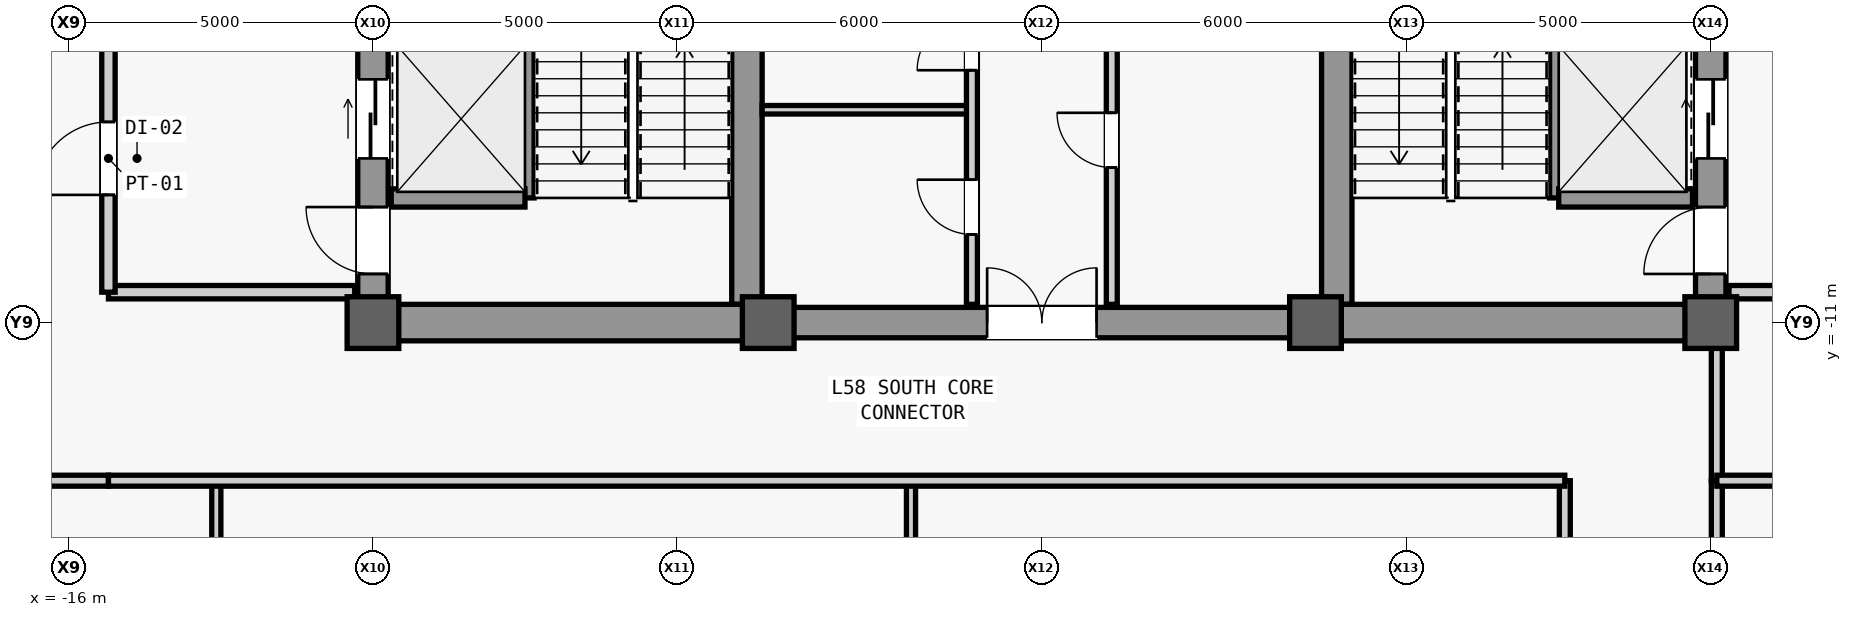
"""IFC4 building model, lengths in metres.
Left out: names, types, materials, properties, quantities, classifications, styles, units other than length and angle.
Written with IfcOpenShell. Run it as: python <this file> out.ifc"""

import sys

from ifc_helpers import new_model, si_unit, direction, frame, frame_2d, origin, origin_2d, place, context, subcontext, project, spatial, rectangle, extrude, source, transform, mapped, element, fill, save


model = new_model("IFC4")
c1 = context("Model", 3, precision=1e-05, world=origin(), true_north=direction((0.0, 1.0)))
c2 = subcontext(c1, "Body", "Model", "MODEL_VIEW")
j1 = project(units=[si_unit("LENGTHUNIT", "METRE"), si_unit("PLANEANGLEUNIT", "RADIAN")], contexts=[c1])
p1 = place(None, origin())
s1 = spatial("IfcSite", under=j1, at=p1, CompositionType="ELEMENT")
p2 = place(p1, origin())
s2 = spatial("IfcBuilding", under=s1, at=p2, CompositionType="ELEMENT")
p3 = place(p2, frame((0.0, 0.0, 247.1)))
s3 = spatial("IfcBuildingStorey", under=s2, at=p3, CompositionType="ELEMENT", Elevation=247.1)
m1 = source(origin(), c2, "Body", "SweptSolid", [
    extrude(rectangle(XDim=22.0, YDim=0.5, at=frame_2d((11.0, 0.0))), origin(), (0.0, 0.0, 1.0), 3.78),
])
p4 = place(p3, frame((-11.0, -11.0, 0.0), z_axis=(0.0, 0.0, 1.0), x_axis=(0.0, 1.0, 0.0)))
e1 = element("IfcWall", 1, at=p4, inside=s3, PredefinedType="SHEAR", context=c2, shape_type="MappedRepresentation", body=[
    mapped(m1, transform((0.0, 0.0, 0.0), scale=1.0)),
])
m2 = source(origin(), c2, "Body", "SweptSolid", [
    extrude(rectangle(XDim=1.1, YDim=2.2, at=frame_2d((0.55, 1.1))), frame((0.0, 0.26, 0.0), z_axis=(0.0, -1.0, 0.0), x_axis=(1.0, 0.0, 0.0)), (0.0, 0.0, 1.0), 0.52),
])
p5 = place(p4, frame((0.8, 0.0, 0.0)))
e2 = element("IfcOpeningElement", 2, at=p5, cuts=e1, PredefinedType="OPENING", context=c2, shape_type="MappedRepresentation", body=[
    mapped(m2, transform((0.0, 0.0, 0.0), scale=1.0)),
])
p6 = place(p4, frame((12.5, 0.0, 0.0)))
e3 = element("IfcOpeningElement", 3, at=p6, cuts=e1, PredefinedType="OPENING", context=c2, shape_type="MappedRepresentation", body=[
    mapped(m2, transform((0.0, 0.0, 0.0), scale=1.0)),
])
m3 = source(origin(), c2, "Body", "SweptSolid", [
    extrude(rectangle(XDim=0.9, YDim=2.15, at=frame_2d((0.45, 1.075))), frame((0.0, 0.26, 0.0), z_axis=(0.0, -1.0, 0.0), x_axis=(1.0, 0.0, 0.0)), (0.0, 0.0, 1.0), 0.52),
])
p7 = place(p4, frame((7.575, 0.0, 0.0)))
e4 = element("IfcOpeningElement", 4, at=p7, cuts=e1, PredefinedType="OPENING", context=c2, shape_type="MappedRepresentation", body=[
    mapped(m3, transform((0.0, 0.0, 0.0), scale=1.0)),
])
m4 = source(origin(), c2, "Body", "SweptSolid", [
    extrude(rectangle(XDim=1.3, YDim=2.3, at=frame_2d((0.65, 1.15))), frame((0.0, 0.26, 0.0), z_axis=(0.0, -1.0, 0.0), x_axis=(1.0, 0.0, 0.0)), (0.0, 0.0, 1.0), 0.52),
])
p8 = place(p4, frame((2.7, 0.0, 0.0)))
e5 = element("IfcOpeningElement", 5, at=p8, cuts=e1, PredefinedType="OPENING", context=c2, shape_type="MappedRepresentation", body=[
    mapped(m4, transform((0.0, 0.0, 0.0), scale=1.0)),
])
p9 = place(p3, frame((11.0, -11.0, 0.0), z_axis=(0.0, 0.0, 1.0), x_axis=(0.0, 1.0, 0.0)))
e6 = element("IfcWall", 6, at=p9, inside=s3, PredefinedType="SHEAR", context=c2, shape_type="MappedRepresentation", body=[
    mapped(m1, transform((0.0, 0.0, 0.0), scale=1.0)),
])
p10 = place(p9, frame((0.8, 0.0, 0.0)))
e7 = element("IfcOpeningElement", 7, at=p10, cuts=e6, PredefinedType="OPENING", context=c2, shape_type="MappedRepresentation", body=[
    mapped(m2, transform((0.0, 0.0, 0.0), scale=1.0)),
])
p11 = place(p9, frame((7.575, 0.0, 0.0)))
e8 = element("IfcOpeningElement", 8, at=p11, cuts=e6, PredefinedType="OPENING", context=c2, shape_type="MappedRepresentation", body=[
    mapped(m3, transform((0.0, 0.0, 0.0), scale=1.0)),
])
p12 = place(p9, frame((2.7, 0.0, 0.0)))
e9 = element("IfcOpeningElement", 9, at=p12, cuts=e6, PredefinedType="OPENING", context=c2, shape_type="MappedRepresentation", body=[
    mapped(m4, transform((0.0, 0.0, 0.0), scale=1.0)),
])
p13 = place(p9, frame((13.35, 0.0, 0.0)))
e10 = element("IfcOpeningElement", 10, at=p13, cuts=e6, PredefinedType="OPENING", context=c2, shape_type="MappedRepresentation", body=[
    mapped(m4, transform((0.0, 0.0, 0.0), scale=1.0)),
])
m5 = source(origin(), c2, "Body", "SweptSolid", [
    extrude(rectangle(XDim=21.4, YDim=0.5, at=frame_2d((10.7, 0.0))), origin(), (0.0, 0.0, 1.0), 3.78),
])
for number, where, z_axis, x_axis in (
    (11, (-4.85, -10.7, 0.0), (0.0, 0.0, 1.0), (0.0, 1.0, 0.0)),
    (12, (4.85, -10.7, 0.0), (0.0, 0.0, 1.0), (0.0, 1.0, 0.0)),
):
    element("IfcWall", number, at=place(p3, frame(where, z_axis=z_axis, x_axis=x_axis)), inside=s3, PredefinedType="SHEAR", context=c2, shape_type="MappedRepresentation", body=[
        mapped(m5, transform((0.0, 0.0, 0.0), scale=1.0)),
    ])
m6 = source(origin(), c2, "Body", "SweptSolid", [
    extrude(rectangle(XDim=5.9, YDim=0.6, at=frame_2d((2.95, 0.0))), origin(), (0.0, 0.0, 1.0), 3.78),
])
for number, where, z_axis, x_axis in (
    (13, (-10.75, -11.0, 0.0), (0.0, 0.0, 1.0), (1.0, 0.0, 0.0)),
    (14, (4.85, -11.0, 0.0), (0.0, 0.0, 1.0), (1.0, 0.0, 0.0)),
):
    element("IfcWall", number, at=place(p3, frame(where, z_axis=z_axis, x_axis=x_axis)), inside=s3, PredefinedType="SHEAR", context=c2, shape_type="MappedRepresentation", body=[
        mapped(m6, transform((0.0, 0.0, 0.0), scale=1.0)),
    ])
m7 = source(origin(), c2, "Body", "SweptSolid", [
    extrude(rectangle(XDim=9.2, YDim=0.5, at=frame_2d((4.6, 0.0))), origin(), (0.0, 0.0, 1.0), 3.78),
])
p14 = place(p3, frame((-4.6, -11.0, 0.0), z_axis=(0.0, 0.0, 1.0), x_axis=(1.0, 0.0, 0.0)))
e15 = element("IfcWall", 15, at=p14, inside=s3, PredefinedType="SHEAR", context=c2, shape_type="MappedRepresentation", body=[
    mapped(m7, transform((0.0, 0.0, 0.0), scale=1.0)),
])
m8 = source(origin(), c2, "Body", "SweptSolid", [
    extrude(rectangle(XDim=1.8, YDim=2.25, at=frame_2d((0.9, 1.125))), frame((0.0, 0.26, 0.0), z_axis=(0.0, -1.0, 0.0), x_axis=(1.0, 0.0, 0.0)), (0.0, 0.0, 1.0), 0.52),
])
p15 = place(p14, frame((3.7, 0.0, 0.0)))
e16 = element("IfcOpeningElement", 16, at=p15, cuts=e15, PredefinedType="OPENING", context=c2, shape_type="MappedRepresentation", body=[
    mapped(m8, transform((0.0, 0.0, 0.0), scale=1.0)),
])
m9 = source(origin(), c2, "Body", "SweptSolid", [
    extrude(rectangle(XDim=0.85, YDim=0.85, at=origin_2d()), origin(), (0.0, 0.0, 1.0), 4.0),
])
for number, where, z_axis, x_axis in (
    (17, (-11.0, -11.0, 0.0), (0.0, 0.0, 1.0), (1.0, 0.0, 0.0)),
    (18, (-4.5, -11.0, 0.0), (0.0, 0.0, 1.0), (1.0, 0.0, 0.0)),
    (19, (4.5, -11.0, 0.0), (0.0, 0.0, 1.0), (1.0, 0.0, 0.0)),
    (20, (11.0, -11.0, 0.0), (0.0, 0.0, 1.0), (1.0, 0.0, 0.0)),
):
    element("IfcColumn", number, at=place(p3, frame(where, z_axis=z_axis, x_axis=x_axis)), inside=s3, PredefinedType="COLUMN", context=c2, shape_type="MappedRepresentation", body=[
        mapped(m9, transform((0.0, 0.0, 0.0), scale=1.0)),
    ])
m10 = source(origin(), c2, "Body", "SweptSolid", [
    extrude(rectangle(XDim=7.8, YDim=0.3, at=frame_2d((3.9, 0.0))), origin(), (0.0, 0.0, 1.0), 3.78),
])
p16 = place(p3, frame((-8.5, -8.95, 0.0), z_axis=(0.0, 0.0, 1.0), x_axis=(0.0, 1.0, 0.0)))
e21 = element("IfcWall", 21, at=p16, inside=s3, PredefinedType="SHEAR", context=c2, shape_type="MappedRepresentation", body=[
    mapped(m10, transform((0.0, 0.0, 0.0), scale=1.0)),
])
m11 = source(origin(), c2, "Body", "SweptSolid", [
    extrude(rectangle(XDim=2.2, YDim=0.3, at=frame_2d((1.1, 0.0))), origin(), (0.0, 0.0, 1.0), 3.78),
])
p17 = place(p3, frame((-10.7, -8.95, 0.0), z_axis=(0.0, 0.0, 1.0), x_axis=(1.0, 0.0, 0.0)))
e22 = element("IfcWall", 22, at=p17, inside=s3, PredefinedType="SHEAR", context=c2, shape_type="MappedRepresentation", body=[
    mapped(m11, transform((0.0, 0.0, 0.0), scale=1.0)),
])
p18 = place(p3, frame((8.5, -8.95, 0.0), z_axis=(0.0, 0.0, 1.0), x_axis=(0.0, 1.0, 0.0)))
e23 = element("IfcWall", 23, at=p18, inside=s3, PredefinedType="SHEAR", context=c2, shape_type="MappedRepresentation", body=[
    mapped(m10, transform((0.0, 0.0, 0.0), scale=1.0)),
])
p19 = place(p3, frame((8.5, -8.95, 0.0), z_axis=(0.0, 0.0, 1.0), x_axis=(1.0, 0.0, 0.0)))
e24 = element("IfcWall", 24, at=p19, inside=s3, PredefinedType="SHEAR", context=c2, shape_type="MappedRepresentation", body=[
    mapped(m11, transform((0.0, 0.0, 0.0), scale=1.0)),
])
m12 = source(origin(), c2, "Body", "SweptSolid", [
    extrude(rectangle(XDim=4.05, YDim=0.22, at=frame_2d((2.025, 0.0))), origin(), (0.0, 0.0, 1.0), 3.78),
])
p20 = place(p3, frame((-15.35, -10.5, 0.0), z_axis=(0.0, 0.0, 1.0), x_axis=(1.0, 0.0, 0.0)))
e25 = element("IfcWall", 25, at=p20, inside=s3, PredefinedType="PARTITIONING", context=c2, shape_type="MappedRepresentation", body=[
    mapped(m12, transform((0.0, 0.0, 0.0), scale=1.0)),
])
m13 = source(origin(), c2, "Body", "SweptSolid", [
    extrude(rectangle(XDim=4.4, YDim=0.22, at=frame_2d((2.2, 0.0))), origin(), (0.0, 0.0, 1.0), 3.78),
])
p21 = place(p3, frame((-15.35, -10.5, 0.0), z_axis=(0.0, 0.0, 1.0), x_axis=(0.0, 1.0, 0.0)))
e26 = element("IfcWall", 26, at=p21, inside=s3, PredefinedType="PARTITIONING", context=c2, shape_type="MappedRepresentation", body=[
    mapped(m13, transform((0.0, 0.0, 0.0), scale=1.0)),
])
m14 = source(origin(), c2, "Body", "SweptSolid", [
    extrude(rectangle(XDim=1.2, YDim=2.2, at=frame_2d((0.6, 1.1))), frame((0.0, 0.12, 0.0), z_axis=(0.0, -1.0, 0.0), x_axis=(1.0, 0.0, 0.0)), (0.0, 0.0, 1.0), 0.24),
])
p22 = place(p21, frame((1.6, 0.0, 0.0)))
e27 = element("IfcOpeningElement", 27, at=p22, cuts=e26, PredefinedType="OPENING", context=c2, shape_type="MappedRepresentation", body=[
    mapped(m14, transform((0.0, 0.0, 0.0), scale=1.0)),
])
p23 = place(p3, frame((11.3, -10.5, 0.0), z_axis=(0.0, 0.0, 1.0), x_axis=(1.0, 0.0, 0.0)))
e28 = element("IfcWall", 28, at=p23, inside=s3, PredefinedType="PARTITIONING", context=c2, shape_type="MappedRepresentation", body=[
    mapped(m12, transform((0.0, 0.0, 0.0), scale=1.0)),
])
m15 = source(origin(), c2, "Body", "SweptSolid", [
    extrude(rectangle(XDim=3.45, YDim=0.14, at=frame_2d((1.725, 0.0))), origin(), (0.0, 0.0, 1.0), 3.78),
])
p24 = place(p3, frame((-4.6, -7.5, 0.0), z_axis=(0.0, 0.0, 1.0), x_axis=(1.0, 0.0, 0.0)))
e29 = element("IfcWall", 29, at=p24, inside=s3, PredefinedType="PARTITIONING", context=c2, shape_type="MappedRepresentation", body=[
    mapped(m15, transform((0.0, 0.0, 0.0), scale=1.0)),
])
m16 = source(origin(), c2, "Body", "SweptSolid", [
    extrude(rectangle(XDim=5.4, YDim=0.18, at=frame_2d((2.7, 0.0))), origin(), (0.0, 0.0, 1.0), 3.78),
])
p25 = place(p3, frame((-1.15, -10.7, 0.0), z_axis=(0.0, 0.0, 1.0), x_axis=(0.0, 1.0, 0.0)))
e30 = element("IfcWall", 30, at=p25, inside=s3, PredefinedType="PARTITIONING", context=c2, shape_type="MappedRepresentation", body=[
    mapped(m16, transform((0.0, 0.0, 0.0), scale=1.0)),
])
m17 = source(origin(), c2, "Body", "SweptSolid", [
    extrude(rectangle(XDim=0.9, YDim=2.15, at=frame_2d((0.45, 1.075))), frame((0.0, 0.1, 0.0), z_axis=(0.0, -1.0, 0.0), x_axis=(1.0, 0.0, 0.0)), (0.0, 0.0, 1.0), 0.2),
])
p26 = place(p25, frame((1.15, 0.0, 0.0)))
e31 = element("IfcOpeningElement", 31, at=p26, cuts=e30, PredefinedType="OPENING", context=c2, shape_type="MappedRepresentation", body=[
    mapped(m17, transform((0.0, 0.0, 0.0), scale=1.0)),
])
p27 = place(p25, frame((3.85, 0.0, 0.0)))
e32 = element("IfcOpeningElement", 32, at=p27, cuts=e30, PredefinedType="OPENING", context=c2, shape_type="MappedRepresentation", body=[
    mapped(m17, transform((0.0, 0.0, 0.0), scale=1.0)),
])
p28 = place(p3, frame((1.15, -10.7, 0.0), z_axis=(0.0, 0.0, 1.0), x_axis=(0.0, 1.0, 0.0)))
e33 = element("IfcWall", 33, at=p28, inside=s3, PredefinedType="PARTITIONING", context=c2, shape_type="MappedRepresentation", body=[
    mapped(m16, transform((0.0, 0.0, 0.0), scale=1.0)),
])
p29 = place(p28, frame((2.25, 0.0, 0.0)))
e34 = element("IfcOpeningElement", 34, at=p29, cuts=e33, PredefinedType="OPENING", context=c2, shape_type="MappedRepresentation", body=[
    mapped(m17, transform((0.0, 0.0, 0.0), scale=1.0)),
])
m18 = source(origin(), c2, "Body", "SweptSolid", [
    extrude(rectangle(XDim=2.45, YDim=0.18, at=frame_2d((1.225, 0.0))), origin(), (0.0, 0.0, 1.0), 3.78),
])
p30 = place(p3, frame((-17.8, -13.6, 0.0), z_axis=(0.0, 0.0, 1.0), x_axis=(1.0, 0.0, 0.0)))
e35 = element("IfcWall", 35, at=p30, inside=s3, PredefinedType="PARTITIONING", context=c2, shape_type="MappedRepresentation", body=[
    mapped(m18, transform((0.0, 0.0, 0.0), scale=1.0)),
])
m19 = source(origin(), c2, "Body", "SweptSolid", [
    extrude(rectangle(XDim=2.6, YDim=0.18, at=frame_2d((1.3, 0.0))), origin(), (0.0, 0.0, 1.0), 3.085),
])
p31 = place(p3, frame((11.1, -13.6, 0.0), z_axis=(0.0, 0.0, 1.0), x_axis=(0.0, 1.0, 0.0)))
e36 = element("IfcWall", 36, at=p31, inside=s3, PredefinedType="PARTITIONING", context=c2, shape_type="MappedRepresentation", body=[
    mapped(m19, transform((0.0, 0.0, 0.0), scale=1.0)),
])
m20 = source(origin(), c2, "Body", "SweptSolid", [
    extrude(rectangle(XDim=16.4, YDim=0.15, at=frame_2d((8.2, 0.0))), origin(), (0.0, 0.0, 1.0), 3.78),
])
p32 = place(p3, frame((-13.576, -30.0, 0.0), z_axis=(0.0, 0.0, 1.0), x_axis=(0.0, 1.0, 0.0)))
e37 = element("IfcWall", 37, at=p32, inside=s3, PredefinedType="PARTITIONING", context=c2, shape_type="MappedRepresentation", body=[
    mapped(m20, transform((0.0, 0.0, 0.0), scale=1.0)),
])
m21 = source(origin(), c2, "Body", "SweptSolid", [
    extrude(rectangle(XDim=0.95, YDim=2.15, at=frame_2d((0.475, 1.075))), frame((0.0, 0.085, 0.0), z_axis=(0.0, -1.0, 0.0), x_axis=(1.0, 0.0, 0.0)), (0.0, 0.0, 1.0), 0.17),
])
p33 = place(p32, frame((11.825, 0.0, 0.0)))
e38 = element("IfcOpeningElement", 38, at=p33, cuts=e37, PredefinedType="OPENING", context=c2, shape_type="MappedRepresentation", body=[
    mapped(m21, transform((0.0, 0.0, 0.0), scale=1.0)),
])
p34 = place(p3, frame((-2.152, -30.0, 0.0), z_axis=(0.0, 0.0, 1.0), x_axis=(0.0, 1.0, 0.0)))
e39 = element("IfcWall", 39, at=p34, inside=s3, PredefinedType="PARTITIONING", context=c2, shape_type="MappedRepresentation", body=[
    mapped(m20, transform((0.0, 0.0, 0.0), scale=1.0)),
])
p35 = place(p34, frame((11.825, 0.0, 0.0)))
e40 = element("IfcOpeningElement", 40, at=p35, cuts=e39, PredefinedType="OPENING", context=c2, shape_type="MappedRepresentation", body=[
    mapped(m21, transform((0.0, 0.0, 0.0), scale=1.0)),
])
m22 = source(origin(), c2, "Body", "SweptSolid", [
    extrude(rectangle(XDim=16.4, YDim=0.18, at=frame_2d((8.2, 0.0))), origin(), (0.0, 0.0, 1.0), 3.78),
])
p36 = place(p3, frame((8.6, -30.0, 0.0), z_axis=(0.0, 0.0, 1.0), x_axis=(0.0, 1.0, 0.0)))
e41 = element("IfcWall", 41, at=p36, inside=s3, PredefinedType="PARTITIONING", context=c2, shape_type="MappedRepresentation", body=[
    mapped(m22, transform((0.0, 0.0, 0.0), scale=1.0)),
])
m23 = source(origin(), c2, "Body", "SweptSolid", [
    extrude(rectangle(XDim=1.05, YDim=2.2, at=frame_2d((0.525, 1.1))), frame((0.0, 0.1, 0.0), z_axis=(0.0, -1.0, 0.0), x_axis=(1.0, 0.0, 0.0)), (0.0, 0.0, 1.0), 0.2),
])
p37 = place(p36, frame((3.575, 0.0, 0.0)))
e42 = element("IfcOpeningElement", 42, at=p37, cuts=e41, PredefinedType="OPENING", context=c2, shape_type="MappedRepresentation", body=[
    mapped(m23, transform((0.0, 0.0, 0.0), scale=1.0)),
])
m24 = source(origin(), c2, "Body", "SweptSolid", [
    extrude(rectangle(XDim=23.95, YDim=0.18, at=frame_2d((11.975, 0.0))), origin(), (0.0, 0.0, 1.0), 3.78),
])
p38 = place(p3, frame((-15.35, -13.6, 0.0), z_axis=(0.0, 0.0, 1.0), x_axis=(1.0, 0.0, 0.0)))
e43 = element("IfcWall", 43, at=p38, inside=s3, PredefinedType="PARTITIONING", context=c2, shape_type="MappedRepresentation", body=[
    mapped(m24, transform((0.0, 0.0, 0.0), scale=1.0)),
])
m25 = source(origin(), c2, "Body", "SweptSolid", [
    extrude(rectangle(XDim=16.4, YDim=0.18, at=frame_2d((8.2, 0.0))), origin(), (0.0, 0.0, 1.0), 3.085),
])
p39 = place(p3, frame((11.1, -30.0, 0.0), z_axis=(0.0, 0.0, 1.0), x_axis=(0.0, 1.0, 0.0)))
e44 = element("IfcWall", 44, at=p39, inside=s3, PredefinedType="PARTITIONING", context=c2, shape_type="MappedRepresentation", body=[
    mapped(m25, transform((0.0, 0.0, 0.0), scale=1.0)),
])
p40 = place(p39, frame((3.575, 0.0, 0.0)))
e45 = element("IfcOpeningElement", 45, at=p40, cuts=e44, PredefinedType="OPENING", context=c2, shape_type="MappedRepresentation", body=[
    mapped(m23, transform((0.0, 0.0, 0.0), scale=1.0)),
])
m26 = source(origin(), c2, "Body", "SweptSolid", [
    extrude(rectangle(XDim=4.25, YDim=0.18, at=frame_2d((2.125, 0.0))), origin(), (0.0, 0.0, 1.0), 3.78),
])
p41 = place(p3, frame((11.1, -13.6, 0.0), z_axis=(0.0, 0.0, 1.0), x_axis=(1.0, 0.0, 0.0)))
e46 = element("IfcWall", 46, at=p41, inside=s3, PredefinedType="PARTITIONING", context=c2, shape_type="MappedRepresentation", body=[
    mapped(m26, transform((0.0, 0.0, 0.0), scale=1.0)),
])
m27 = source(origin(), c2, "Body", "SweptSolid", [
    extrude(rectangle(XDim=1.1, YDim=2.2, at=frame_2d((0.55, 1.1))), frame((0.0, 0.025, 0.0), z_axis=(0.0, -1.0, 0.0), x_axis=(1.0, 0.0, 0.0)), (0.0, 0.0, 1.0), 0.05),
])
p42 = place(p5, origin())
e47 = element("IfcDoor", 47, at=p42, inside=s3, OperationType="SINGLE_SWING_RIGHT", PredefinedType="DOOR", context=c2, shape_type="MappedRepresentation", body=[
    mapped(m27, transform((0.0, 0.0, 0.0), scale=1.0)),
])
fill(e2, e47)
p43 = place(p10, origin())
e48 = element("IfcDoor", 48, at=p43, inside=s3, OperationType="SINGLE_SWING_LEFT", PredefinedType="DOOR", context=c2, shape_type="MappedRepresentation", body=[
    mapped(m27, transform((0.0, 0.0, 0.0), scale=1.0)),
])
fill(e7, e48)
m28 = source(origin(), c2, "Body", "SweptSolid", [
    extrude(rectangle(XDim=1.2, YDim=2.2, at=frame_2d((0.6, 1.1))), frame((0.0, 0.025, 0.0), z_axis=(0.0, -1.0, 0.0), x_axis=(1.0, 0.0, 0.0)), (0.0, 0.0, 1.0), 0.05),
])
p44 = place(p22, origin())
e49 = element("IfcDoor", 49, at=p44, inside=s3, OperationType="SINGLE_SWING_LEFT", PredefinedType="DOOR", context=c2, shape_type="MappedRepresentation", body=[
    mapped(m28, transform((0.0, 0.0, 0.0), scale=1.0)),
])
fill(e27, e49)
m29 = source(origin(), c2, "Body", "SweptSolid", [
    extrude(rectangle(XDim=0.9, YDim=2.15, at=frame_2d((0.45, 1.075))), frame((0.0, 0.025, 0.0), z_axis=(0.0, -1.0, 0.0), x_axis=(1.0, 0.0, 0.0)), (0.0, 0.0, 1.0), 0.05),
])
p45 = place(p26, origin())
e50 = element("IfcDoor", 50, at=p45, inside=s3, OperationType="SINGLE_SWING_RIGHT", PredefinedType="DOOR", context=c2, shape_type="MappedRepresentation", body=[
    mapped(m29, transform((0.0, 0.0, 0.0), scale=1.0)),
])
fill(e31, e50)
p46 = place(p27, origin())
e51 = element("IfcDoor", 51, at=p46, inside=s3, OperationType="SINGLE_SWING_LEFT", PredefinedType="DOOR", context=c2, shape_type="MappedRepresentation", body=[
    mapped(m29, transform((0.0, 0.0, 0.0), scale=1.0)),
])
fill(e32, e51)
p47 = place(p29, origin())
e52 = element("IfcDoor", 52, at=p47, inside=s3, OperationType="SINGLE_SWING_RIGHT", PredefinedType="DOOR", context=c2, shape_type="MappedRepresentation", body=[
    mapped(m29, transform((0.0, 0.0, 0.0), scale=1.0)),
])
fill(e34, e52)
m30 = source(origin(), c2, "Body", "SweptSolid", [
    extrude(rectangle(XDim=1.8, YDim=2.25, at=frame_2d((0.9, 1.125))), frame((0.0, 0.025, 0.0), z_axis=(0.0, -1.0, 0.0), x_axis=(1.0, 0.0, 0.0)), (0.0, 0.0, 1.0), 0.05),
])
p48 = place(p15, origin())
e53 = element("IfcDoor", 53, at=p48, inside=s3, OperationType="SINGLE_SWING_LEFT", PredefinedType="DOOR", context=c2, shape_type="MappedRepresentation", body=[
    mapped(m30, transform((0.0, 0.0, 0.0), scale=1.0)),
])
fill(e16, e53)
m31 = source(origin(), c2, "Body", "SweptSolid", [
    extrude(rectangle(XDim=1.3, YDim=2.3, at=frame_2d((0.65, 1.15))), frame((0.0, 0.025, 0.0), z_axis=(0.0, -1.0, 0.0), x_axis=(1.0, 0.0, 0.0)), (0.0, 0.0, 1.0), 0.05),
])
p49 = place(p8, origin())
e54 = element("IfcDoor", 54, at=p49, inside=s3, OperationType="SLIDING_TO_LEFT", PredefinedType="DOOR", context=c2, shape_type="MappedRepresentation", body=[
    mapped(m31, transform((0.0, 0.0, 0.0), scale=1.0)),
])
fill(e5, e54)
p50 = place(p12, origin())
e55 = element("IfcDoor", 55, at=p50, inside=s3, OperationType="SLIDING_TO_LEFT", PredefinedType="DOOR", context=c2, shape_type="MappedRepresentation", body=[
    mapped(m31, transform((0.0, 0.0, 0.0), scale=1.0)),
])
fill(e9, e55)
save(model, sys.argv[1])
